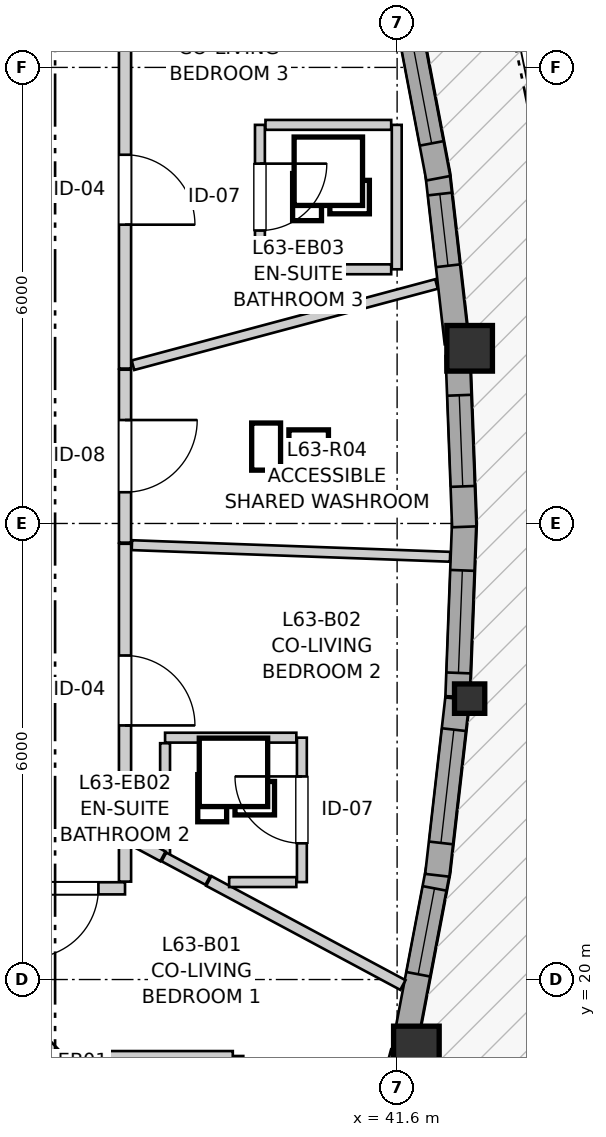
"""IFC4 building model, lengths in metres.
Left out: names, types, materials, properties, quantities, classifications, styles, units other than length and angle.
Written with IfcOpenShell. Run it as: python <this file> out.ifc"""

import sys

from ifc_helpers import new_model, si_unit, direction, frame, frame_2d, origin, origin_2d, place, context, subcontext, project, spatial, rectangle, i_section, extrude, source, transform, mapped, element, fill, save


model = new_model("IFC4")
c1 = context("Model", 3, precision=1e-05, world=origin(), true_north=direction((0.0, 1.0)))
c2 = subcontext(c1, "Body", "Model", "MODEL_VIEW")
j1 = project(units=[si_unit("LENGTHUNIT", "METRE"), si_unit("PLANEANGLEUNIT", "RADIAN")], contexts=[c1])
p1 = place(None, origin())
s1 = spatial("IfcSite", under=j1, at=p1, CompositionType="ELEMENT")
p2 = place(p1, origin())
s2 = spatial("IfcBuilding", under=s1, at=p2, CompositionType="ELEMENT")
p3 = place(p2, frame((0.0, 0.0, 211.6)))
s3 = spatial("IfcBuildingStorey", under=s2, at=p3, CompositionType="ELEMENT", Elevation=211.6)
m1 = source(origin(), c2, "Body", "SweptSolid", [
    extrude(rectangle(XDim=0.6, YDim=0.6, at=origin_2d()), origin(), (0.0, 0.0, 1.0), 2.96),
])
p4 = place(p3, frame((41.854, 19.086, 0.0), z_axis=(0.0, 0.0, 1.0), x_axis=(1.0, 0.0, 0.0)))
e1 = element("IfcColumn", 1, at=p4, inside=s3, PredefinedType="COLUMN", context=c2, shape_type="MappedRepresentation", body=[
    mapped(m1, transform((0.0, 0.0, 0.0), x_axis=(1.0, 0.0, 0.0), y_axis=(0.0, 1.0, 0.0), z_axis=(0.0, 0.0, 1.0), scale=1.0)),
])
m2 = source(origin(), c2, "Body", "SweptSolid", [
    extrude(i_section(OverallWidth=0.398, OverallDepth=0.387, WebThickness=0.019, FlangeThickness=0.03, FilletRadius=0.015, at=origin_2d()), origin(), (0.0, 0.0, 1.0), 2.96),
])
p5 = place(p3, frame((42.554, 23.696, 0.0), z_axis=(0.0, 0.0, 1.0), x_axis=(1.0, 0.0, 0.0)))
e2 = element("IfcColumn", 2, at=p5, inside=s3, PredefinedType="PILASTER", context=c2, shape_type="MappedRepresentation", body=[
    mapped(m2, transform((0.0, 0.0, 0.0), x_axis=(1.0, 0.0, 0.0), y_axis=(0.0, 1.0, 0.0), z_axis=(0.0, 0.0, 1.0), scale=1.0)),
])
p6 = place(p3, frame((42.554, 28.304, 0.0), z_axis=(0.0, 0.0, 1.0), x_axis=(1.0, 0.0, 0.0)))
e3 = element("IfcColumn", 3, at=p6, inside=s3, PredefinedType="COLUMN", context=c2, shape_type="MappedRepresentation", body=[
    mapped(m1, transform((0.0, 0.0, 0.0), x_axis=(1.0, 0.0, 0.0), y_axis=(0.0, 1.0, 0.0), z_axis=(0.0, 0.0, 1.0), scale=1.0)),
])
p7 = place(p3, frame((41.076, 16.786, 0.0), z_axis=(0.0, 0.0, 1.0), x_axis=(0.257037260973, 0.966401493413, 0.0)))
e4 = element("IfcWall", 4, at=p7, inside=s3, PredefinedType="SOLIDWALL", context=c2, shape_type="SweptSolid", body=[
    extrude(rectangle(XDim=2.333, YDim=0.32, at=frame_2d((1.167, 0.0))), origin(), (0.0, 0.0, 1.0), 2.58),
])
p8 = place(p7, frame((0.446, 0.0, 0.82)))
e5 = element("IfcOpeningElement", 5, at=p8, cuts=e4, PredefinedType="OPENING", context=c2, shape_type="SweptSolid", body=[
    extrude(rectangle(XDim=1.45, YDim=1.25, at=frame_2d((0.725, 0.625))), frame((0.0, 0.17, 0.0), z_axis=(0.0, -1.0, 0.0), x_axis=(1.0, 0.0, 0.0)), (0.0, 0.0, 1.0), 0.34),
])
p9 = place(p3, frame((41.713, 19.205, 0.0), z_axis=(0.0, 0.0, 1.0), x_axis=(0.186691464441, 0.982418595663, 0.0)))
e6 = element("IfcWall", 6, at=p9, inside=s3, PredefinedType="SOLIDWALL", context=c2, shape_type="SweptSolid", body=[
    extrude(rectangle(XDim=2.294, YDim=0.32, at=frame_2d((1.147, 0.0))), origin(), (0.0, 0.0, 1.0), 2.58),
])
p10 = place(p9, frame((0.88, 0.0, 0.82)))
e7 = element("IfcOpeningElement", 7, at=p10, cuts=e6, PredefinedType="OPENING", context=c2, shape_type="SweptSolid", body=[
    extrude(rectangle(XDim=1.15, YDim=1.2, at=frame_2d((0.575, 0.6))), frame((0.0, 0.17, 0.0), z_axis=(0.0, -1.0, 0.0), x_axis=(1.0, 0.0, 0.0)), (0.0, 0.0, 1.0), 0.34),
])
p11 = place(p3, frame((42.128, 21.371, 0.0), z_axis=(0.0, 0.0, 1.0), x_axis=(0.113319777802, 0.993558567956, 0.0)))
e8 = element("IfcWall", 8, at=p11, inside=s3, PredefinedType="SOLIDWALL", context=c2, shape_type="SweptSolid", body=[
    extrude(rectangle(XDim=2.338, YDim=0.32, at=frame_2d((1.169, 0.0))), origin(), (0.0, 0.0, 1.0), 2.58),
])
p12 = place(p11, frame((0.429, 0.0, 0.82)))
e9 = element("IfcOpeningElement", 9, at=p12, cuts=e8, PredefinedType="OPENING", context=c2, shape_type="SweptSolid", body=[
    extrude(rectangle(XDim=1.5, YDim=1.45, at=frame_2d((0.75, 0.725))), frame((0.0, 0.17, 0.0), z_axis=(0.0, -1.0, 0.0), x_axis=(1.0, 0.0, 0.0)), (0.0, 0.0, 1.0), 0.34),
])
p13 = place(p3, frame((42.395, 23.722, 0.0), z_axis=(0.0, 0.0, 1.0), x_axis=(0.038025668885, 0.999276762717, 0.0)))
e10 = element("IfcWall", 10, at=p13, inside=s3, PredefinedType="SOLIDWALL", context=c2, shape_type="SweptSolid", body=[
    extrude(rectangle(XDim=2.324, YDim=0.32, at=frame_2d((1.162, 0.0))), origin(), (0.0, 0.0, 1.0), 2.58),
])
p14 = place(p13, frame((0.312, 0.0, 0.82)))
e11 = element("IfcOpeningElement", 11, at=p14, cuts=e10, PredefinedType="OPENING", context=c2, shape_type="SweptSolid", body=[
    extrude(rectangle(XDim=1.35, YDim=1.45, at=frame_2d((0.675, 0.725))), frame((0.0, 0.17, 0.0), z_axis=(0.0, -1.0, 0.0), x_axis=(1.0, 0.0, 0.0)), (0.0, 0.0, 1.0), 0.34),
])
p15 = place(p3, frame((42.483, 25.956, 0.0), z_axis=(0.0, 0.0, 1.0), x_axis=(-0.038013039165, 0.999277243238, 0.0)))
e12 = element("IfcWall", 12, at=p15, inside=s3, PredefinedType="SOLIDWALL", context=c2, shape_type="SweptSolid", body=[
    extrude(rectangle(XDim=2.254, YDim=0.32, at=frame_2d((1.127, 0.0))), origin(), (0.0, 0.0, 1.0), 2.58),
])
p16 = place(p15, frame((0.532, 0.0, 0.82)))
e13 = element("IfcOpeningElement", 13, at=p16, cuts=e12, PredefinedType="OPENING", context=c2, shape_type="SweptSolid", body=[
    extrude(rectangle(XDim=1.2, YDim=1.45, at=frame_2d((0.6, 0.725))), frame((0.0, 0.17, 0.0), z_axis=(0.0, -1.0, 0.0), x_axis=(1.0, 0.0, 0.0)), (0.0, 0.0, 1.0), 0.34),
])
p17 = place(p3, frame((42.385, 28.376, 0.0), z_axis=(0.0, 0.0, 1.0), x_axis=(-0.113267221285, 0.993564560853, 0.0)))
e14 = element("IfcWall", 14, at=p17, inside=s3, PredefinedType="SOLIDWALL", context=c2, shape_type="SweptSolid", body=[
    extrude(rectangle(XDim=2.268, YDim=0.32, at=frame_2d((1.134, 0.0))), origin(), (0.0, 0.0, 1.0), 2.58),
])
p18 = place(p17, frame((1.021, 0.0, 0.82)))
e15 = element("IfcOpeningElement", 15, at=p18, cuts=e14, PredefinedType="OPENING", context=c2, shape_type="SweptSolid", body=[
    extrude(rectangle(XDim=0.95, YDim=1.35, at=frame_2d((0.475, 0.675))), frame((0.0, 0.17, 0.0), z_axis=(0.0, -1.0, 0.0), x_axis=(1.0, 0.0, 0.0)), (0.0, 0.0, 1.0), 0.34),
])
p19 = place(p3, frame((42.141, 30.542, 0.0), z_axis=(0.0, 0.0, 1.0), x_axis=(-0.186632734065, 0.982429754525, 0.0)))
e16 = element("IfcWall", 16, at=p19, inside=s3, PredefinedType="SOLIDWALL", context=c2, shape_type="SweptSolid", body=[
    extrude(rectangle(XDim=2.364, YDim=0.32, at=frame_2d((1.182, 0.0))), origin(), (0.0, 0.0, 1.0), 2.58),
])
p20 = place(p19, frame((0.467, 0.0, 0.82)))
e17 = element("IfcOpeningElement", 17, at=p20, cuts=e16, PredefinedType="OPENING", context=c2, shape_type="SweptSolid", body=[
    extrude(rectangle(XDim=1.45, YDim=1.25, at=frame_2d((0.725, 0.625))), frame((0.0, 0.17, 0.0), z_axis=(0.0, -1.0, 0.0), x_axis=(1.0, 0.0, 0.0)), (0.0, 0.0, 1.0), 0.34),
])
p21 = place(p3, frame((38.02, 32.748, 0.0), z_axis=(0.0, 0.0, 1.0), x_axis=(0.0, -1.0, 0.0)))
e18 = element("IfcWall", 18, at=p21, inside=s3, PredefinedType="PARTITIONING", context=c2, shape_type="SweptSolid", body=[
    extrude(rectangle(XDim=4.71, YDim=0.16, at=frame_2d((2.355, 0.0))), origin(), (0.0, 0.0, 1.0), 2.628),
])
p22 = place(p21, frame((1.897, 0.0, 0.0)))
e19 = element("IfcOpeningElement", 19, at=p22, cuts=e18, PredefinedType="OPENING", context=c2, shape_type="SweptSolid", body=[
    extrude(rectangle(XDim=0.92, YDim=2.1, at=frame_2d((0.46, 1.05))), frame((0.0, 0.09, 0.0), z_axis=(0.0, -1.0, 0.0), x_axis=(1.0, 0.0, 0.0)), (0.0, 0.0, 1.0), 0.18),
])
p23 = place(p3, frame((38.02, 25.733, 0.0), z_axis=(0.0, 0.0, 1.0), x_axis=(0.0, -1.0, 0.0)))
e20 = element("IfcWall", 20, at=p23, inside=s3, PredefinedType="PARTITIONING", context=c2, shape_type="SweptSolid", body=[
    extrude(rectangle(XDim=3.862, YDim=0.16, at=frame_2d((1.931, 0.0))), origin(), (0.0, 0.0, 1.0), 2.96),
])
p24 = place(p23, frame((1.47, 0.0, 0.0)))
e21 = element("IfcOpeningElement", 21, at=p24, cuts=e20, PredefinedType="OPENING", context=c2, shape_type="SweptSolid", body=[
    extrude(rectangle(XDim=0.92, YDim=2.1, at=frame_2d((0.46, 1.05))), frame((0.0, 0.09, 0.0), z_axis=(0.0, -1.0, 0.0), x_axis=(1.0, 0.0, 0.0)), (0.0, 0.0, 1.0), 0.18),
])
p25 = place(p3, frame((38.02, 28.023, 0.0), z_axis=(0.0, 0.0, 1.0), x_axis=(0.0, -1.0, 0.0)))
e22 = element("IfcWall", 22, at=p25, inside=s3, PredefinedType="PARTITIONING", context=c2, shape_type="SweptSolid", body=[
    extrude(rectangle(XDim=2.275, YDim=0.16, at=frame_2d((1.137, 0.0))), origin(), (0.0, 0.0, 1.0), 2.96),
])
p26 = place(p25, frame((0.662, 0.0, 0.0)))
e23 = element("IfcOpeningElement", 23, at=p26, cuts=e22, PredefinedType="OPENING", context=c2, shape_type="SweptSolid", body=[
    extrude(rectangle(XDim=0.95, YDim=2.1, at=frame_2d((0.475, 1.05))), frame((0.0, 0.09, 0.0), z_axis=(0.0, -1.0, 0.0), x_axis=(1.0, 0.0, 0.0)), (0.0, 0.0, 1.0), 0.18),
])
p27 = place(p3, frame((39.511, 17.094, 0.0), z_axis=(0.0, 0.0, 1.0), x_axis=(0.0, 1.0, 0.0)))
e24 = element("IfcWall", 24, at=p27, inside=s3, PredefinedType="PARTITIONING", context=c2, shape_type="SweptSolid", body=[
    extrude(rectangle(XDim=1.9, YDim=0.13, at=frame_2d((0.95, 0.0))), origin(), (0.0, 0.0, 1.0), 2.96),
])
p28 = place(p27, frame((0.51, 0.0, 0.0)))
e25 = element("IfcOpeningElement", 25, at=p28, cuts=e24, PredefinedType="OPENING", context=c2, shape_type="SweptSolid", body=[
    extrude(rectangle(XDim=0.88, YDim=2.05, at=frame_2d((0.44, 1.025))), frame((0.0, 0.075, 0.0), z_axis=(0.0, -1.0, 0.0), x_axis=(1.0, 0.0, 0.0)), (0.0, 0.0, 1.0), 0.15),
])
p29 = place(p3, frame((40.347, 21.282, 0.0), z_axis=(0.0, 0.0, 1.0), x_axis=(0.0, 1.0, 0.0)))
e26 = element("IfcWall", 26, at=p29, inside=s3, PredefinedType="PARTITIONING", context=c2, shape_type="SweptSolid", body=[
    extrude(rectangle(XDim=1.9, YDim=0.13, at=frame_2d((0.95, 0.0))), origin(), (0.0, 0.0, 1.0), 2.598),
])
p30 = place(p29, frame((0.51, 0.0, 0.0)))
e27 = element("IfcOpeningElement", 27, at=p30, cuts=e26, PredefinedType="OPENING", context=c2, shape_type="SweptSolid", body=[
    extrude(rectangle(XDim=0.88, YDim=2.05, at=frame_2d((0.44, 1.025))), frame((0.0, 0.075, 0.0), z_axis=(0.0, -1.0, 0.0), x_axis=(1.0, 0.0, 0.0)), (0.0, 0.0, 1.0), 0.15),
])
p31 = place(p3, frame((39.795, 31.244, 0.0), z_axis=(0.0, 0.0, 1.0), x_axis=(0.0, -1.0, 0.0)))
e28 = element("IfcWall", 28, at=p31, inside=s3, PredefinedType="PARTITIONING", context=c2, shape_type="SweptSolid", body=[
    extrude(rectangle(XDim=1.9, YDim=0.13, at=frame_2d((0.95, 0.0))), origin(), (0.0, 0.0, 1.0), 2.598),
])
p32 = place(p31, frame((0.51, 0.0, 0.0)))
e29 = element("IfcOpeningElement", 29, at=p32, cuts=e28, PredefinedType="OPENING", context=c2, shape_type="SweptSolid", body=[
    extrude(rectangle(XDim=0.88, YDim=2.05, at=frame_2d((0.44, 1.025))), frame((0.0, 0.075, 0.0), z_axis=(0.0, -1.0, 0.0), x_axis=(1.0, 0.0, 0.0)), (0.0, 0.0, 1.0), 0.15),
])
p33 = place(p3, frame((38.02, 21.2, 0.0), z_axis=(0.0, 0.0, 1.0), x_axis=(-1.0, 0.0, 0.0)))
e30 = element("IfcWall", 30, at=p33, inside=s3, PredefinedType="PARTITIONING", context=c2, shape_type="SweptSolid", body=[
    extrude(rectangle(XDim=1.612, YDim=0.16, at=frame_2d((0.806, 0.0))), origin(), (0.0, 0.0, 1.0), 2.96),
])
p34 = place(p33, frame((0.35, 0.0, 0.0)))
e31 = element("IfcOpeningElement", 31, at=p34, cuts=e30, PredefinedType="OPENING", context=c2, shape_type="SweptSolid", body=[
    extrude(rectangle(XDim=0.92, YDim=2.1, at=frame_2d((0.46, 1.05))), frame((0.0, 0.09, 0.0), z_axis=(0.0, -1.0, 0.0), x_axis=(1.0, 0.0, 0.0)), (0.0, 0.0, 1.0), 0.18),
])
p35 = place(p3, frame((38.11, 25.715, 0.0), z_axis=(0.0, 0.0, 1.0), x_axis=(0.99933433165, -0.036481414253, 0.0)))
e32 = element("IfcWall", 32, at=p35, inside=s3, PredefinedType="PARTITIONING", context=c2, shape_type="SweptSolid", body=[
    extrude(rectangle(XDim=4.189, YDim=0.13, at=frame_2d((2.095, 0.0))), origin(), (0.0, 0.0, 1.0), 2.96),
])
p36 = place(p3, frame((38.125, 28.082, 0.0), z_axis=(0.0, 0.0, 1.0), x_axis=(0.965997321458, 0.258552073934, 0.0)))
e33 = element("IfcWall", 33, at=p36, inside=s3, PredefinedType="PARTITIONING", context=c2, shape_type="SweptSolid", body=[
    extrude(rectangle(XDim=4.134, YDim=0.13, at=frame_2d((2.067, 0.0))), origin(), (0.0, 0.0, 1.0), 2.96),
])
p37 = place(p3, frame((39.122, 21.297, 0.0), z_axis=(0.0, 0.0, 1.0), x_axis=(0.881308328415, -0.472541670402, 0.0)))
e34 = element("IfcWall", 34, at=p37, inside=s3, PredefinedType="PARTITIONING", context=c2, shape_type="SweptSolid", body=[
    extrude(rectangle(XDim=2.898, YDim=0.145, at=frame_2d((1.449, 0.0))), origin(), (0.0, 0.0, 1.0), 2.96),
])
p38 = place(p3, frame((36.458, 19.686, 0.0), z_axis=(0.0, 0.0, 1.0), x_axis=(0.695231916786, -0.718785490868, 0.0)))
e35 = element("IfcWall", 35, at=p38, inside=s3, PredefinedType="PARTITIONING", context=c2, shape_type="SweptSolid", body=[
    extrude(rectangle(XDim=1.824, YDim=0.145, at=frame_2d((0.912, 0.0))), origin(), (0.0, 0.0, 1.0), 2.96),
])
p39 = place(p3, frame((41.595, 29.344, 0.0), z_axis=(0.0, 0.0, 1.0), x_axis=(0.0, 1.0, 0.0)))
e36 = element("IfcWall", 36, at=p39, inside=s3, PredefinedType="PARTITIONING", context=c2, shape_type="SweptSolid", body=[
    extrude(rectangle(XDim=1.9, YDim=0.13, at=frame_2d((0.95, 0.0))), origin(), (0.0, 0.0, 1.0), 2.96),
])
p40 = place(p3, frame((37.711, 18.994, 0.0), z_axis=(0.0, 0.0, 1.0), x_axis=(1.0, 0.0, 0.0)))
e37 = element("IfcWall", 37, at=p40, inside=s3, PredefinedType="PARTITIONING", context=c2, shape_type="SweptSolid", body=[
    extrude(rectangle(XDim=1.727, YDim=0.13, at=frame_2d((0.864, 0.0))), origin(), (0.0, 0.0, 1.0), 2.96),
])
p41 = place(p3, frame((38.547, 23.182, 0.0), z_axis=(0.0, 0.0, 1.0), x_axis=(1.0, 0.0, 0.0)))
e38 = element("IfcWall", 38, at=p41, inside=s3, PredefinedType="PARTITIONING", context=c2, shape_type="SweptSolid", body=[
    extrude(rectangle(XDim=1.727, YDim=0.13, at=frame_2d((0.863, 0.0))), origin(), (0.0, 0.0, 1.0), 2.96),
])
for number, where, z_axis, x_axis in (
    (39, (39.868, 31.244, 0.0), (0.0, 0.0, 1.0), (1.0, 0.0, 0.0)),
    (40, (39.868, 29.344, 0.0), (0.0, 0.0, 1.0), (1.0, 0.0, 0.0)),
):
    element("IfcWall", number, at=place(p3, frame(where, z_axis=z_axis, x_axis=x_axis)), inside=s3, PredefinedType="PARTITIONING", context=c2, shape_type="SweptSolid", body=[
        extrude(rectangle(XDim=1.654, YDim=0.13, at=frame_2d((0.827, 0.0))), origin(), (0.0, 0.0, 1.0), 2.96),
    ])
p42 = place(p3, frame((38.547, 21.605, 0.0), z_axis=(0.0, 0.0, 1.0), x_axis=(0.0, 1.0, 0.0)))
e41 = element("IfcWall", 41, at=p42, inside=s3, PredefinedType="PARTITIONING", context=c2, shape_type="SweptSolid", body=[
    extrude(rectangle(XDim=1.504, YDim=0.13, at=frame_2d((0.752, 0.0))), origin(), (0.0, 0.0, 1.0), 2.628),
])
p43 = place(p3, frame((39.39, 21.282, 0.0), z_axis=(0.0, 0.0, 1.0), x_axis=(1.0, 0.0, 0.0)))
e42 = element("IfcWall", 42, at=p43, inside=s3, PredefinedType="PARTITIONING", context=c2, shape_type="SweptSolid", body=[
    extrude(rectangle(XDim=0.884, YDim=0.13, at=frame_2d((0.442, 0.0))), origin(), (0.0, 0.0, 1.0), 2.96),
])
p44 = place(p3, frame((38.02, 21.288, 0.0), z_axis=(0.0, 0.0, 1.0), x_axis=(0.0, 1.0, 0.0)))
e43 = element("IfcWall", 43, at=p44, inside=s3, PredefinedType="PARTITIONING", context=c2, shape_type="SweptSolid", body=[
    extrude(rectangle(XDim=0.568, YDim=0.16, at=frame_2d((0.284, 0.0))), origin(), (0.0, 0.0, 1.0), 2.96),
])
p45 = place(p3, frame((38.532, 21.613, 0.0), z_axis=(0.0, 0.0, 1.0), x_axis=(0.881618593919, -0.471962556626, 0.0)))
e44 = element("IfcWall", 44, at=p45, inside=s3, PredefinedType="PARTITIONING", context=c2, shape_type="SweptSolid", body=[
    extrude(rectangle(XDim=0.654, YDim=0.13, at=frame_2d((0.327, 0.0))), origin(), (0.0, 0.0, 1.0), 2.96),
])
p46 = place(p3, frame((38.06, 21.867, 0.0), z_axis=(0.0, 0.0, 1.0), x_axis=(0.881026965879, -0.473066047601, 0.0)))
e45 = element("IfcWall", 45, at=p46, inside=s3, PredefinedType="PARTITIONING", context=c2, shape_type="SweptSolid", body=[
    extrude(rectangle(XDim=0.521, YDim=0.145, at=frame_2d((0.261, 0.0))), origin(), (0.0, 0.0, 1.0), 2.96),
])
m3 = source(origin(), c2, "Body", "SweptSolid", [
    extrude(rectangle(XDim=1.15, YDim=1.2, at=frame_2d((0.575, 0.6))), frame((0.0, 0.03, 0.0), z_axis=(0.0, -1.0, 0.0), x_axis=(1.0, 0.0, 0.0)), (0.0, 0.0, 1.0), 0.06),
])
p47 = place(p10, origin())
e46 = element("IfcWindow", 46, at=p47, inside=s3, PartitioningType="SINGLE_PANEL", PredefinedType="WINDOW", context=c2, shape_type="MappedRepresentation", body=[
    mapped(m3, transform((0.0, 0.0, 0.0), x_axis=(1.0, 0.0, 0.0), y_axis=(0.0, 1.0, 0.0), z_axis=(0.0, 0.0, 1.0), scale=1.0)),
])
fill(e7, e46)
m4 = source(origin(), c2, "Body", "SweptSolid", [
    extrude(rectangle(XDim=1.5, YDim=1.45, at=frame_2d((0.75, 0.725))), frame((0.0, 0.03, 0.0), z_axis=(0.0, -1.0, 0.0), x_axis=(1.0, 0.0, 0.0)), (0.0, 0.0, 1.0), 0.06),
])
p48 = place(p12, origin())
e47 = element("IfcWindow", 47, at=p48, inside=s3, PartitioningType="SINGLE_PANEL", PredefinedType="WINDOW", context=c2, shape_type="MappedRepresentation", body=[
    mapped(m4, transform((0.0, 0.0, 0.0), x_axis=(1.0, 0.0, 0.0), y_axis=(0.0, 1.0, 0.0), z_axis=(0.0, 0.0, 1.0), scale=1.0)),
])
fill(e9, e47)
m5 = source(origin(), c2, "Body", "SweptSolid", [
    extrude(rectangle(XDim=1.35, YDim=1.45, at=frame_2d((0.675, 0.725))), frame((0.0, 0.03, 0.0), z_axis=(0.0, -1.0, 0.0), x_axis=(1.0, 0.0, 0.0)), (0.0, 0.0, 1.0), 0.06),
])
p49 = place(p14, origin())
e48 = element("IfcWindow", 48, at=p49, inside=s3, PartitioningType="SINGLE_PANEL", PredefinedType="WINDOW", context=c2, shape_type="MappedRepresentation", body=[
    mapped(m5, transform((0.0, 0.0, 0.0), x_axis=(1.0, 0.0, 0.0), y_axis=(0.0, 1.0, 0.0), z_axis=(0.0, 0.0, 1.0), scale=1.0)),
])
fill(e11, e48)
m6 = source(origin(), c2, "Body", "SweptSolid", [
    extrude(rectangle(XDim=1.2, YDim=1.45, at=frame_2d((0.6, 0.725))), frame((0.0, 0.03, 0.0), z_axis=(0.0, -1.0, 0.0), x_axis=(1.0, 0.0, 0.0)), (0.0, 0.0, 1.0), 0.06),
])
p50 = place(p16, origin())
e49 = element("IfcWindow", 49, at=p50, inside=s3, PartitioningType="SINGLE_PANEL", PredefinedType="WINDOW", context=c2, shape_type="MappedRepresentation", body=[
    mapped(m6, transform((0.0, 0.0, 0.0), x_axis=(1.0, 0.0, 0.0), y_axis=(0.0, 1.0, 0.0), z_axis=(0.0, 0.0, 1.0), scale=1.0)),
])
fill(e13, e49)
m7 = source(origin(), c2, "Body", "SweptSolid", [
    extrude(rectangle(XDim=0.95, YDim=1.35, at=frame_2d((0.475, 0.675))), frame((0.0, 0.03, 0.0), z_axis=(0.0, -1.0, 0.0), x_axis=(1.0, 0.0, 0.0)), (0.0, 0.0, 1.0), 0.06),
])
p51 = place(p18, origin())
e50 = element("IfcWindow", 50, at=p51, inside=s3, PartitioningType="SINGLE_PANEL", PredefinedType="WINDOW", context=c2, shape_type="MappedRepresentation", body=[
    mapped(m7, transform((0.0, 0.0, 0.0), x_axis=(1.0, 0.0, 0.0), y_axis=(0.0, 1.0, 0.0), z_axis=(0.0, 0.0, 1.0), scale=1.0)),
])
fill(e15, e50)
m8 = source(origin(), c2, "Body", "SweptSolid", [
    extrude(rectangle(XDim=1.45, YDim=1.25, at=frame_2d((0.725, 0.625))), frame((0.0, 0.03, 0.0), z_axis=(0.0, -1.0, 0.0), x_axis=(1.0, 0.0, 0.0)), (0.0, 0.0, 1.0), 0.06),
])
p52 = place(p20, origin())
e51 = element("IfcWindow", 51, at=p52, inside=s3, PartitioningType="SINGLE_PANEL", PredefinedType="WINDOW", context=c2, shape_type="MappedRepresentation", body=[
    mapped(m8, transform((0.0, 0.0, 0.0), x_axis=(1.0, 0.0, 0.0), y_axis=(0.0, 1.0, 0.0), z_axis=(0.0, 0.0, 1.0), scale=1.0)),
])
fill(e17, e51)
m9 = source(origin(), c2, "Body", "SweptSolid", [
    extrude(rectangle(XDim=0.92, YDim=2.1, at=frame_2d((0.46, 1.05))), frame((0.0, 0.025, 0.0), z_axis=(0.0, -1.0, 0.0), x_axis=(1.0, 0.0, 0.0)), (0.0, 0.0, 1.0), 0.05),
])
p53 = place(p22, origin())
e52 = element("IfcDoor", 52, at=p53, inside=s3, OperationType="SINGLE_SWING_RIGHT", PredefinedType="DOOR", context=c2, shape_type="MappedRepresentation", body=[
    mapped(m9, transform((0.0, 0.0, 0.0), x_axis=(1.0, 0.0, 0.0), y_axis=(0.0, 1.0, 0.0), z_axis=(0.0, 0.0, 1.0), scale=1.0)),
])
fill(e19, e52)
p54 = place(p24, origin())
e53 = element("IfcDoor", 53, at=p54, inside=s3, OperationType="SINGLE_SWING_RIGHT", PredefinedType="DOOR", context=c2, shape_type="MappedRepresentation", body=[
    mapped(m9, transform((0.0, 0.0, 0.0), x_axis=(1.0, 0.0, 0.0), y_axis=(0.0, 1.0, 0.0), z_axis=(0.0, 0.0, 1.0), scale=1.0)),
])
fill(e21, e53)
m10 = source(origin(), c2, "Body", "SweptSolid", [
    extrude(rectangle(XDim=0.95, YDim=2.1, at=frame_2d((0.475, 1.05))), frame((0.0, 0.025, 0.0), z_axis=(0.0, -1.0, 0.0), x_axis=(1.0, 0.0, 0.0)), (0.0, 0.0, 1.0), 0.05),
])
p55 = place(p26, origin())
e54 = element("IfcDoor", 54, at=p55, inside=s3, OperationType="SINGLE_SWING_LEFT", PredefinedType="DOOR", context=c2, shape_type="MappedRepresentation", body=[
    mapped(m10, transform((0.0, 0.0, 0.0), x_axis=(1.0, 0.0, 0.0), y_axis=(0.0, 1.0, 0.0), z_axis=(0.0, 0.0, 1.0), scale=1.0)),
])
fill(e23, e54)
m11 = source(origin(), c2, "Body", "SweptSolid", [
    extrude(rectangle(XDim=0.88, YDim=2.05, at=frame_2d((0.44, 1.025))), frame((0.0, 0.025, 0.0), z_axis=(0.0, -1.0, 0.0), x_axis=(1.0, 0.0, 0.0)), (0.0, 0.0, 1.0), 0.05),
])
p56 = place(p30, origin())
e55 = element("IfcDoor", 55, at=p56, inside=s3, OperationType="SINGLE_SWING_RIGHT", PredefinedType="DOOR", context=c2, shape_type="MappedRepresentation", body=[
    mapped(m11, transform((0.0, 0.0, 0.0), x_axis=(1.0, 0.0, 0.0), y_axis=(0.0, 1.0, 0.0), z_axis=(0.0, 0.0, 1.0), scale=1.0)),
])
fill(e27, e55)
p57 = place(p32, origin())
e56 = element("IfcDoor", 56, at=p57, inside=s3, OperationType="SINGLE_SWING_LEFT", PredefinedType="DOOR", context=c2, shape_type="MappedRepresentation", body=[
    mapped(m11, transform((0.0, 0.0, 0.0), x_axis=(1.0, 0.0, 0.0), y_axis=(0.0, 1.0, 0.0), z_axis=(0.0, 0.0, 1.0), scale=1.0)),
])
fill(e29, e56)
p58 = place(p34, origin())
e57 = element("IfcDoor", 57, at=p58, inside=s3, OperationType="SINGLE_SWING_RIGHT", PredefinedType="DOOR", context=c2, shape_type="MappedRepresentation", body=[
    mapped(m9, transform((0.0, 0.0, 0.0), x_axis=(1.0, 0.0, 0.0), y_axis=(0.0, 1.0, 0.0), z_axis=(0.0, 0.0, 1.0), scale=1.0)),
])
fill(e31, e57)
save(model, sys.argv[1])
